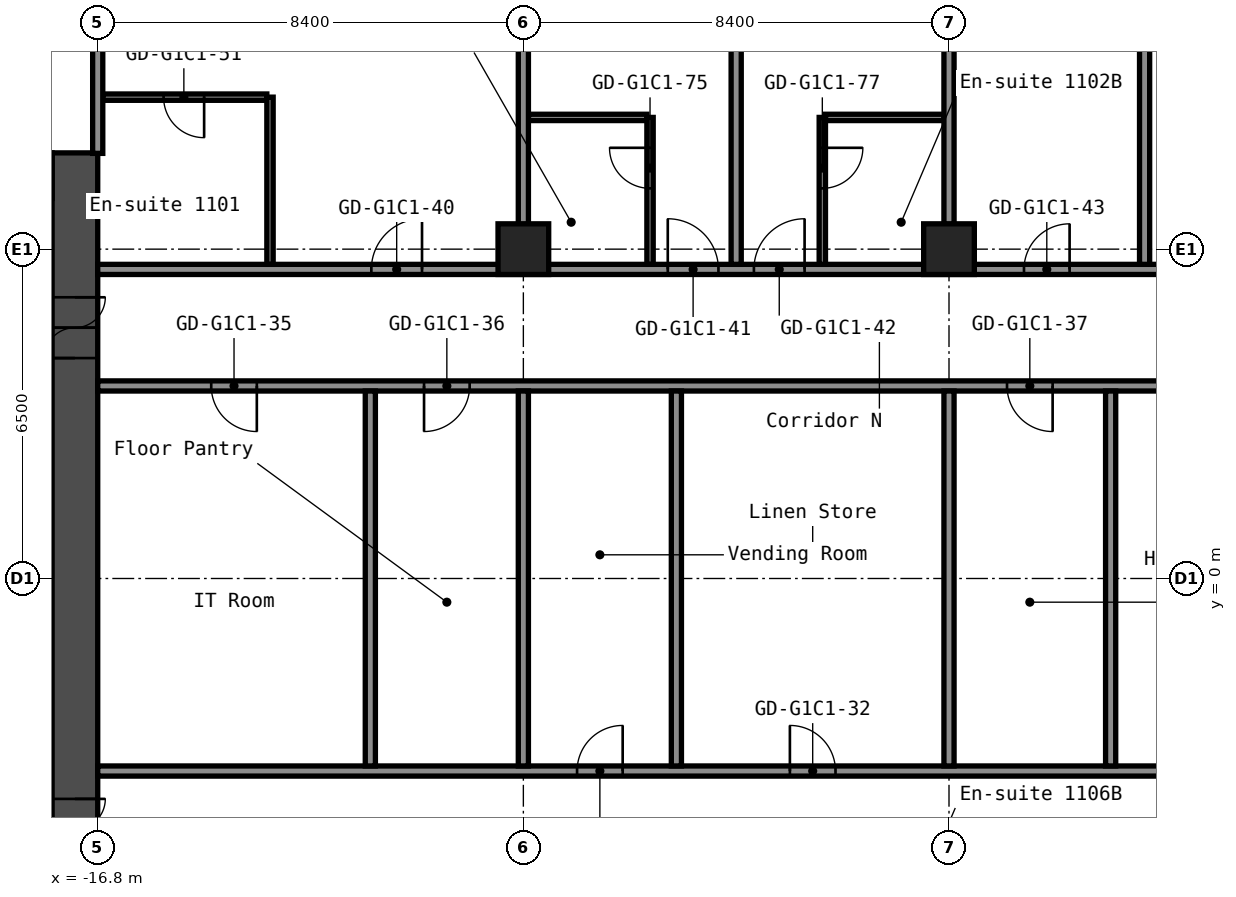
"""IFC4 building model, lengths in metres.
Left out: names, types, materials, properties, quantities, classifications, styles, units other than length and angle.
Written with IfcOpenShell. Run it as: python <this file> out.ifc"""

import sys

from ifc_helpers import new_model, si_unit, direction, frame, frame_2d, origin, origin_2d, place, context, subcontext, project, spatial, rectangle, hollow_rectangle, extrude, element, fill, save


model = new_model("IFC4")
c1 = context("Model", 3, precision=1e-05, world=origin(), true_north=direction((0.0, 1.0)))
c2 = subcontext(c1, "Body", "Model", "MODEL_VIEW")
j1 = project(units=[si_unit("LENGTHUNIT", "METRE"), si_unit("PLANEANGLEUNIT", "RADIAN")], contexts=[c1])
p1 = place(None, origin())
s1 = spatial("IfcSite", under=j1, at=p1, CompositionType="ELEMENT")
p2 = place(p1, origin())
s2 = spatial("IfcBuilding", under=s1, at=p2, CompositionType="ELEMENT")
p3 = place(p2, frame((0.0, 0.0, 42.2)))
s3 = spatial("IfcBuildingStorey", under=s2, at=p3, CompositionType="ELEMENT", Elevation=42.2)
for number, where, z_axis, x_axis in (
    (1, (-8.4, 6.5, 0.0), (0.0, 0.0, 1.0), (1.0, 0.0, 0.0)),
    (2, (0.0, 6.5, 0.0), (0.0, 0.0, 1.0), (1.0, 0.0, 0.0)),
):
    element("IfcColumn", number, at=place(p3, frame(where, z_axis=z_axis, x_axis=x_axis)), inside=s3, PredefinedType="COLUMN", context=c2, shape_type="SweptSolid", body=[
        extrude(hollow_rectangle(XDim=1.0, YDim=1.0, WallThickness=0.04, at=origin_2d()), origin(), (0.0, 0.0, 1.0), 2.8),
    ])
p4 = place(p3, frame((-17.25, -8.4, 0.0), z_axis=(0.0, 0.0, 1.0), x_axis=(0.0, 1.0, 0.0)))
e3 = element("IfcWall", 3, at=p4, inside=s3, PredefinedType="SHEAR", context=c2, shape_type="SweptSolid", body=[
    extrude(rectangle(XDim=16.8, YDim=0.9, at=frame_2d((8.4, 0.0))), origin(), (0.0, 0.0, 1.0), 2.8),
])
p5 = place(p4, frame((12.75, 0.0, 0.0)))
e4 = element("IfcOpeningElement", 4, at=p5, cuts=e3, PredefinedType="OPENING", context=c2, shape_type="SweptSolid", body=[
    extrude(rectangle(XDim=1.2, YDim=2.1, at=frame_2d((0.6, 1.05))), frame((0.0, 0.46, 0.0), z_axis=(0.0, -1.0, 0.0), x_axis=(1.0, 0.0, 0.0)), (0.0, 0.0, 1.0), 0.92),
])
p6 = place(p4, frame((2.85, 0.0, 0.0)))
e5 = element("IfcOpeningElement", 5, at=p6, cuts=e3, PredefinedType="OPENING", context=c2, shape_type="SweptSolid", body=[
    extrude(rectangle(XDim=1.2, YDim=2.1, at=frame_2d((0.6, 1.05))), frame((0.0, 0.46, 0.0), z_axis=(0.0, -1.0, 0.0), x_axis=(1.0, 0.0, 0.0)), (0.0, 0.0, 1.0), 0.92),
])
p7 = place(p3, frame((-32.7, 7.95, 0.0), z_axis=(0.0, 0.0, 1.0), x_axis=(1.0, 0.0, 0.0)))
e6 = element("IfcWall", 6, at=p7, inside=s3, PredefinedType="SHEAR", context=c2, shape_type="SweptSolid", body=[
    extrude(rectangle(XDim=15.0, YDim=0.9, at=frame_2d((7.5, 0.0))), origin(), (0.0, 0.0, 1.0), 2.8),
])
p8 = place(p7, frame((3.4, 0.0, 0.0)))
e7 = element("IfcOpeningElement", 7, at=p8, cuts=e6, PredefinedType="OPENING", context=c2, shape_type="SweptSolid", body=[
    extrude(rectangle(XDim=1.2, YDim=2.1, at=frame_2d((0.6, 1.05))), frame((0.0, 0.46, 0.0), z_axis=(0.0, -1.0, 0.0), x_axis=(1.0, 0.0, 0.0)), (0.0, 0.0, 1.0), 0.92),
])
p9 = place(p7, frame((0.75, 0.0, 0.0)))
e8 = element("IfcOpeningElement", 8, at=p9, cuts=e6, PredefinedType="OPENING", context=c2, shape_type="SweptSolid", body=[
    extrude(rectangle(XDim=0.9, YDim=2.1, at=frame_2d((0.45, 1.05))), frame((0.0, 0.46, 0.0), z_axis=(0.0, -1.0, 0.0), x_axis=(1.0, 0.0, 0.0)), (0.0, 0.0, 1.0), 0.92),
])
p10 = place(p3, frame((-16.8, -3.8, 0.0), z_axis=(0.0, 0.0, 1.0), x_axis=(1.0, 0.0, 0.0)))
e9 = element("IfcWall", 9, at=p10, inside=s3, PredefinedType="PARTITIONING", context=c2, shape_type="SweptSolid", body=[
    extrude(rectangle(XDim=33.6, YDim=0.2, at=frame_2d((16.8, 0.0))), origin(), (0.0, 0.0, 1.0), 2.8),
])
p11 = place(p10, frame((9.46, 0.0, 0.0)))
e10 = element("IfcOpeningElement", 10, at=p11, cuts=e9, PredefinedType="OPENING", context=c2, shape_type="SweptSolid", body=[
    extrude(rectangle(XDim=0.9, YDim=2.1, at=frame_2d((0.45, 1.05))), frame((0.0, 0.11, 0.0), z_axis=(0.0, -1.0, 0.0), x_axis=(1.0, 0.0, 0.0)), (0.0, 0.0, 1.0), 0.22),
])
p12 = place(p10, frame((13.66, 0.0, 0.0)))
e11 = element("IfcOpeningElement", 11, at=p12, cuts=e9, PredefinedType="OPENING", context=c2, shape_type="SweptSolid", body=[
    extrude(rectangle(XDim=0.9, YDim=2.1, at=frame_2d((0.45, 1.05))), frame((0.0, 0.11, 0.0), z_axis=(0.0, -1.0, 0.0), x_axis=(1.0, 0.0, 0.0)), (0.0, 0.0, 1.0), 0.22),
])
p13 = place(p10, frame((26.6, 0.0, 0.0)))
e12 = element("IfcOpeningElement", 12, at=p13, cuts=e9, PredefinedType="OPENING", context=c2, shape_type="SweptSolid", body=[
    extrude(rectangle(XDim=0.9, YDim=2.1, at=frame_2d((0.45, 1.05))), frame((0.0, 0.11, 0.0), z_axis=(0.0, -1.0, 0.0), x_axis=(1.0, 0.0, 0.0)), (0.0, 0.0, 1.0), 0.22),
])
p14 = place(p10, frame((30.8, 0.0, 0.0)))
e13 = element("IfcOpeningElement", 13, at=p14, cuts=e9, PredefinedType="OPENING", context=c2, shape_type="SweptSolid", body=[
    extrude(rectangle(XDim=0.9, YDim=2.1, at=frame_2d((0.45, 1.05))), frame((0.0, 0.11, 0.0), z_axis=(0.0, -1.0, 0.0), x_axis=(1.0, 0.0, 0.0)), (0.0, 0.0, 1.0), 0.22),
])
p15 = place(p3, frame((-16.8, 3.8, 0.0), z_axis=(0.0, 0.0, 1.0), x_axis=(1.0, 0.0, 0.0)))
e14 = element("IfcWall", 14, at=p15, inside=s3, PredefinedType="PARTITIONING", context=c2, shape_type="SweptSolid", body=[
    extrude(rectangle(XDim=33.6, YDim=0.2, at=frame_2d((16.8, 0.0))), origin(), (0.0, 0.0, 1.0), 2.8),
])
p16 = place(p15, frame((2.24, 0.0, 0.0)))
e15 = element("IfcOpeningElement", 15, at=p16, cuts=e14, PredefinedType="OPENING", context=c2, shape_type="SweptSolid", body=[
    extrude(rectangle(XDim=0.9, YDim=2.1, at=frame_2d((0.45, 1.05))), frame((0.0, 0.11, 0.0), z_axis=(0.0, -1.0, 0.0), x_axis=(1.0, 0.0, 0.0)), (0.0, 0.0, 1.0), 0.22),
])
p17 = place(p15, frame((6.44, 0.0, 0.0)))
e16 = element("IfcOpeningElement", 16, at=p17, cuts=e14, PredefinedType="OPENING", context=c2, shape_type="SweptSolid", body=[
    extrude(rectangle(XDim=0.9, YDim=2.1, at=frame_2d((0.45, 1.05))), frame((0.0, 0.11, 0.0), z_axis=(0.0, -1.0, 0.0), x_axis=(1.0, 0.0, 0.0)), (0.0, 0.0, 1.0), 0.22),
])
p18 = place(p15, frame((17.945, 0.0, 0.0)))
e17 = element("IfcOpeningElement", 17, at=p18, cuts=e14, PredefinedType="OPENING", context=c2, shape_type="SweptSolid", body=[
    extrude(rectangle(XDim=0.9, YDim=2.1, at=frame_2d((0.45, 1.05))), frame((0.0, 0.11, 0.0), z_axis=(0.0, -1.0, 0.0), x_axis=(1.0, 0.0, 0.0)), (0.0, 0.0, 1.0), 0.22),
])
p19 = place(p15, frame((22.145, 0.0, 0.0)))
e18 = element("IfcOpeningElement", 18, at=p19, cuts=e14, PredefinedType="OPENING", context=c2, shape_type="SweptSolid", body=[
    extrude(rectangle(XDim=0.9, YDim=2.1, at=frame_2d((0.45, 1.05))), frame((0.0, 0.11, 0.0), z_axis=(0.0, -1.0, 0.0), x_axis=(1.0, 0.0, 0.0)), (0.0, 0.0, 1.0), 0.22),
])
p20 = place(p3, frame((-16.8, 6.1, 0.0), z_axis=(0.0, 0.0, 1.0), x_axis=(1.0, 0.0, 0.0)))
e19 = element("IfcWall", 19, at=p20, inside=s3, PredefinedType="PARTITIONING", context=c2, shape_type="SweptSolid", body=[
    extrude(rectangle(XDim=33.6, YDim=0.2, at=frame_2d((16.8, 0.0))), origin(), (0.0, 0.0, 1.0), 2.8),
])
p21 = place(p20, frame((5.4, 0.0, 0.0)))
e20 = element("IfcOpeningElement", 20, at=p21, cuts=e19, PredefinedType="OPENING", context=c2, shape_type="SweptSolid", body=[
    extrude(rectangle(XDim=1.0, YDim=2.1, at=frame_2d((0.5, 1.05))), frame((0.0, 0.11, 0.0), z_axis=(0.0, -1.0, 0.0), x_axis=(1.0, 0.0, 0.0)), (0.0, 0.0, 1.0), 0.22),
])
p22 = place(p20, frame((11.25, 0.0, 0.0)))
e21 = element("IfcOpeningElement", 21, at=p22, cuts=e19, PredefinedType="OPENING", context=c2, shape_type="SweptSolid", body=[
    extrude(rectangle(XDim=1.0, YDim=2.1, at=frame_2d((0.5, 1.05))), frame((0.0, 0.11, 0.0), z_axis=(0.0, -1.0, 0.0), x_axis=(1.0, 0.0, 0.0)), (0.0, 0.0, 1.0), 0.22),
])
p23 = place(p20, frame((12.95, 0.0, 0.0)))
e22 = element("IfcOpeningElement", 22, at=p23, cuts=e19, PredefinedType="OPENING", context=c2, shape_type="SweptSolid", body=[
    extrude(rectangle(XDim=1.0, YDim=2.1, at=frame_2d((0.5, 1.05))), frame((0.0, 0.11, 0.0), z_axis=(0.0, -1.0, 0.0), x_axis=(1.0, 0.0, 0.0)), (0.0, 0.0, 1.0), 0.22),
])
p24 = place(p20, frame((18.28, 0.0, 0.0)))
e23 = element("IfcOpeningElement", 23, at=p24, cuts=e19, PredefinedType="OPENING", context=c2, shape_type="SweptSolid", body=[
    extrude(rectangle(XDim=0.9, YDim=2.1, at=frame_2d((0.45, 1.05))), frame((0.0, 0.11, 0.0), z_axis=(0.0, -1.0, 0.0), x_axis=(1.0, 0.0, 0.0)), (0.0, 0.0, 1.0), 0.22),
])
p25 = place(p20, frame((22.48, 0.0, 0.0)))
e24 = element("IfcOpeningElement", 24, at=p25, cuts=e19, PredefinedType="OPENING", context=c2, shape_type="SweptSolid", body=[
    extrude(rectangle(XDim=0.9, YDim=2.1, at=frame_2d((0.45, 1.05))), frame((0.0, 0.11, 0.0), z_axis=(0.0, -1.0, 0.0), x_axis=(1.0, 0.0, 0.0)), (0.0, 0.0, 1.0), 0.22),
])
p26 = place(p20, frame((28.05, 0.0, 0.0)))
e25 = element("IfcOpeningElement", 25, at=p26, cuts=e19, PredefinedType="OPENING", context=c2, shape_type="SweptSolid", body=[
    extrude(rectangle(XDim=1.0, YDim=2.1, at=frame_2d((0.5, 1.05))), frame((0.0, 0.11, 0.0), z_axis=(0.0, -1.0, 0.0), x_axis=(1.0, 0.0, 0.0)), (0.0, 0.0, 1.0), 0.22),
])
p27 = place(p20, frame((29.75, 0.0, 0.0)))
e26 = element("IfcOpeningElement", 26, at=p27, cuts=e19, PredefinedType="OPENING", context=c2, shape_type="SweptSolid", body=[
    extrude(rectangle(XDim=1.0, YDim=2.1, at=frame_2d((0.5, 1.05))), frame((0.0, 0.11, 0.0), z_axis=(0.0, -1.0, 0.0), x_axis=(1.0, 0.0, 0.0)), (0.0, 0.0, 1.0), 0.22),
])
p28 = place(p3, frame((-8.3, 9.1, 0.0), z_axis=(0.0, 0.0, 1.0), x_axis=(1.0, 0.0, 0.0)))
e27 = element("IfcWall", 27, at=p28, inside=s3, PredefinedType="PARTITIONING", context=c2, shape_type="SweptSolid", body=[
    extrude(rectangle(XDim=2.338, YDim=0.125, at=frame_2d((1.169, 0.0))), origin(), (0.0, 0.0, 1.0), 2.8),
])
p29 = place(p3, frame((-2.438, 9.1, 0.0), z_axis=(0.0, 0.0, 1.0), x_axis=(1.0, 0.0, 0.0)))
e28 = element("IfcWall", 28, at=p29, inside=s3, PredefinedType="PARTITIONING", context=c2, shape_type="SweptSolid", body=[
    extrude(rectangle(XDim=2.337, YDim=0.125, at=frame_2d((1.169, 0.0))), origin(), (0.0, 0.0, 1.0), 2.8),
])
p30 = place(p3, frame((-16.7, 9.5, 0.0), z_axis=(0.0, 0.0, 1.0), x_axis=(1.0, 0.0, 0.0)))
e29 = element("IfcWall", 29, at=p30, inside=s3, PredefinedType="PARTITIONING", context=c2, shape_type="SweptSolid", body=[
    extrude(rectangle(XDim=3.238, YDim=0.125, at=frame_2d((1.619, 0.0))), origin(), (0.0, 0.0, 1.0), 2.8),
])
p31 = place(p30, frame((1.2, 0.0, 0.0)))
e30 = element("IfcOpeningElement", 30, at=p31, cuts=e29, PredefinedType="OPENING", context=c2, shape_type="SweptSolid", body=[
    extrude(rectangle(XDim=0.8, YDim=2.1, at=frame_2d((0.4, 1.05))), frame((0.0, 0.073, 0.0), z_axis=(0.0, -1.0, 0.0), x_axis=(1.0, 0.0, 0.0)), (0.0, 0.0, 1.0), 0.145),
])
p32 = place(p3, frame((-16.8, 8.39, 0.0), z_axis=(0.0, 0.0, 1.0), x_axis=(0.0, 1.0, 0.0)))
e31 = element("IfcWall", 31, at=p32, inside=s3, PredefinedType="PARTITIONING", context=c2, shape_type="SweptSolid", body=[
    extrude(rectangle(XDim=11.91, YDim=0.2, at=frame_2d((5.955, 0.0))), origin(), (0.0, 0.0, 1.0), 2.8),
])
p33 = place(p3, frame((-13.4, 6.2, 0.0), z_axis=(0.0, 0.0, 1.0), x_axis=(0.0, 1.0, 0.0)))
e32 = element("IfcWall", 32, at=p33, inside=s3, PredefinedType="PARTITIONING", context=c2, shape_type="SweptSolid", body=[
    extrude(rectangle(XDim=3.3, YDim=0.125, at=frame_2d((1.65, 0.0))), origin(), (0.0, 0.0, 1.0), 2.8),
])
for number, where, z_axis, x_axis in (
    (33, (-11.42, -3.7, 0.0), (0.0, 0.0, 1.0), (0.0, 1.0, 0.0)),
    (34, (-8.4, -3.7, 0.0), (0.0, 0.0, 1.0), (0.0, 1.0, 0.0)),
):
    element("IfcWall", number, at=place(p3, frame(where, z_axis=z_axis, x_axis=x_axis)), inside=s3, PredefinedType="PARTITIONING", context=c2, shape_type="SweptSolid", body=[
        extrude(rectangle(XDim=7.4, YDim=0.2, at=frame_2d((3.7, 0.0))), origin(), (0.0, 0.0, 1.0), 2.8),
    ])
p34 = place(p3, frame((-8.4, 6.99, 0.0), z_axis=(0.0, 0.0, 1.0), x_axis=(0.0, 1.0, 0.0)))
e35 = element("IfcWall", 35, at=p34, inside=s3, PredefinedType="PARTITIONING", context=c2, shape_type="SweptSolid", body=[
    extrude(rectangle(XDim=13.31, YDim=0.2, at=frame_2d((6.655, 0.0))), origin(), (0.0, 0.0, 1.0), 2.8),
])
p35 = place(p3, frame((-5.9, 6.2, 0.0), z_axis=(0.0, 0.0, 1.0), x_axis=(0.0, 1.0, 0.0)))
e36 = element("IfcWall", 36, at=p35, inside=s3, PredefinedType="PARTITIONING", context=c2, shape_type="SweptSolid", body=[
    extrude(rectangle(XDim=2.9, YDim=0.125, at=frame_2d((1.45, 0.0))), origin(), (0.0, 0.0, 1.0), 2.8),
])
p36 = place(p35, frame((1.5, 0.0, 0.0)))
e37 = element("IfcOpeningElement", 37, at=p36, cuts=e36, PredefinedType="OPENING", context=c2, shape_type="SweptSolid", body=[
    extrude(rectangle(XDim=0.8, YDim=2.1, at=frame_2d((0.4, 1.05))), frame((0.0, 0.073, 0.0), z_axis=(0.0, -1.0, 0.0), x_axis=(1.0, 0.0, 0.0)), (0.0, 0.0, 1.0), 0.145),
])
p37 = place(p3, frame((-5.38, -3.7, 0.0), z_axis=(0.0, 0.0, 1.0), x_axis=(0.0, 1.0, 0.0)))
e38 = element("IfcWall", 38, at=p37, inside=s3, PredefinedType="PARTITIONING", context=c2, shape_type="SweptSolid", body=[
    extrude(rectangle(XDim=7.4, YDim=0.2, at=frame_2d((3.7, 0.0))), origin(), (0.0, 0.0, 1.0), 2.8),
])
p38 = place(p3, frame((-4.2, 6.2, 0.0), z_axis=(0.0, 0.0, 1.0), x_axis=(0.0, 1.0, 0.0)))
e39 = element("IfcWall", 39, at=p38, inside=s3, PredefinedType="PARTITIONING", context=c2, shape_type="SweptSolid", body=[
    extrude(rectangle(XDim=14.1, YDim=0.2, at=frame_2d((7.05, 0.0))), origin(), (0.0, 0.0, 1.0), 2.8),
])
p39 = place(p3, frame((-2.5, 6.2, 0.0), z_axis=(0.0, 0.0, 1.0), x_axis=(0.0, 1.0, 0.0)))
e40 = element("IfcWall", 40, at=p39, inside=s3, PredefinedType="PARTITIONING", context=c2, shape_type="SweptSolid", body=[
    extrude(rectangle(XDim=2.9, YDim=0.125, at=frame_2d((1.45, 0.0))), origin(), (0.0, 0.0, 1.0), 2.8),
])
p40 = place(p39, frame((1.5, 0.0, 0.0)))
e41 = element("IfcOpeningElement", 41, at=p40, cuts=e40, PredefinedType="OPENING", context=c2, shape_type="SweptSolid", body=[
    extrude(rectangle(XDim=0.8, YDim=2.1, at=frame_2d((0.4, 1.05))), frame((0.0, 0.073, 0.0), z_axis=(0.0, -1.0, 0.0), x_axis=(1.0, 0.0, 0.0)), (0.0, 0.0, 1.0), 0.145),
])
p41 = place(p3, frame((0.0, -3.7, 0.0), z_axis=(0.0, 0.0, 1.0), x_axis=(0.0, 1.0, 0.0)))
e42 = element("IfcWall", 42, at=p41, inside=s3, PredefinedType="PARTITIONING", context=c2, shape_type="SweptSolid", body=[
    extrude(rectangle(XDim=7.4, YDim=0.2, at=frame_2d((3.7, 0.0))), origin(), (0.0, 0.0, 1.0), 2.8),
])
p42 = place(p3, frame((0.0, 6.99, 0.0), z_axis=(0.0, 0.0, 1.0), x_axis=(0.0, 1.0, 0.0)))
e43 = element("IfcWall", 43, at=p42, inside=s3, PredefinedType="PARTITIONING", context=c2, shape_type="SweptSolid", body=[
    extrude(rectangle(XDim=13.31, YDim=0.2, at=frame_2d((6.655, 0.0))), origin(), (0.0, 0.0, 1.0), 2.8),
])
p43 = place(p3, frame((3.19, -3.7, 0.0), z_axis=(0.0, 0.0, 1.0), x_axis=(0.0, 1.0, 0.0)))
e44 = element("IfcWall", 44, at=p43, inside=s3, PredefinedType="PARTITIONING", context=c2, shape_type="SweptSolid", body=[
    extrude(rectangle(XDim=7.4, YDim=0.2, at=frame_2d((3.7, 0.0))), origin(), (0.0, 0.0, 1.0), 2.8),
])
p44 = place(p3, frame((3.86, 6.2, 0.0), z_axis=(0.0, 0.0, 1.0), x_axis=(0.0, 1.0, 0.0)))
e45 = element("IfcWall", 45, at=p44, inside=s3, PredefinedType="PARTITIONING", context=c2, shape_type="SweptSolid", body=[
    extrude(rectangle(XDim=14.1, YDim=0.2, at=frame_2d((7.05, 0.0))), origin(), (0.0, 0.0, 1.0), 2.8),
])
p45 = place(p5, origin())
e46 = element("IfcDoor", 46, at=p45, inside=s3, OperationType="DOUBLE_DOOR_SINGLE_SWING", PredefinedType="DOOR", context=c2, shape_type="SweptSolid", body=[
    extrude(rectangle(XDim=1.2, YDim=2.1, at=frame_2d((0.6, 1.05))), frame((0.0, 0.025, 0.0), z_axis=(0.0, -1.0, 0.0), x_axis=(1.0, 0.0, 0.0)), (0.0, 0.0, 1.0), 0.05),
])
fill(e4, e46)
p46 = place(p6, origin())
e47 = element("IfcDoor", 47, at=p46, inside=s3, OperationType="DOUBLE_DOOR_SINGLE_SWING", PredefinedType="DOOR", context=c2, shape_type="SweptSolid", body=[
    extrude(rectangle(XDim=1.2, YDim=2.1, at=frame_2d((0.6, 1.05))), frame((0.0, 0.025, 0.0), z_axis=(0.0, -1.0, 0.0), x_axis=(1.0, 0.0, 0.0)), (0.0, 0.0, 1.0), 0.05),
])
fill(e5, e47)
p47 = place(p11, origin())
e48 = element("IfcDoor", 48, at=p47, inside=s3, OperationType="SINGLE_SWING_LEFT", PredefinedType="DOOR", context=c2, shape_type="SweptSolid", body=[
    extrude(rectangle(XDim=0.9, YDim=2.1, at=frame_2d((0.45, 1.05))), frame((0.0, 0.025, 0.0), z_axis=(0.0, -1.0, 0.0), x_axis=(1.0, 0.0, 0.0)), (0.0, 0.0, 1.0), 0.05),
])
fill(e10, e48)
p48 = place(p12, origin())
e49 = element("IfcDoor", 49, at=p48, inside=s3, OperationType="SINGLE_SWING_RIGHT", PredefinedType="DOOR", context=c2, shape_type="SweptSolid", body=[
    extrude(rectangle(XDim=0.9, YDim=2.1, at=frame_2d((0.45, 1.05))), frame((0.0, 0.025, 0.0), z_axis=(0.0, -1.0, 0.0), x_axis=(1.0, 0.0, 0.0)), (0.0, 0.0, 1.0), 0.05),
])
fill(e11, e49)
p49 = place(p16, origin())
e50 = element("IfcDoor", 50, at=p49, inside=s3, OperationType="SINGLE_SWING_RIGHT", PredefinedType="DOOR", context=c2, shape_type="SweptSolid", body=[
    extrude(rectangle(XDim=0.9, YDim=2.1, at=frame_2d((0.45, 1.05))), frame((0.0, 0.025, 0.0), z_axis=(0.0, -1.0, 0.0), x_axis=(1.0, 0.0, 0.0)), (0.0, 0.0, 1.0), 0.05),
])
fill(e15, e50)
p50 = place(p17, origin())
e51 = element("IfcDoor", 51, at=p50, inside=s3, OperationType="SINGLE_SWING_LEFT", PredefinedType="DOOR", context=c2, shape_type="SweptSolid", body=[
    extrude(rectangle(XDim=0.9, YDim=2.1, at=frame_2d((0.45, 1.05))), frame((0.0, 0.025, 0.0), z_axis=(0.0, -1.0, 0.0), x_axis=(1.0, 0.0, 0.0)), (0.0, 0.0, 1.0), 0.05),
])
fill(e16, e51)
p51 = place(p18, origin())
e52 = element("IfcDoor", 52, at=p51, inside=s3, OperationType="SINGLE_SWING_RIGHT", PredefinedType="DOOR", context=c2, shape_type="SweptSolid", body=[
    extrude(rectangle(XDim=0.9, YDim=2.1, at=frame_2d((0.45, 1.05))), frame((0.0, 0.025, 0.0), z_axis=(0.0, -1.0, 0.0), x_axis=(1.0, 0.0, 0.0)), (0.0, 0.0, 1.0), 0.05),
])
fill(e17, e52)
p52 = place(p21, origin())
e53 = element("IfcDoor", 53, at=p52, inside=s3, OperationType="SINGLE_SWING_LEFT", PredefinedType="DOOR", context=c2, shape_type="SweptSolid", body=[
    extrude(rectangle(XDim=1.0, YDim=2.1, at=frame_2d((0.5, 1.05))), frame((0.0, 0.025, 0.0), z_axis=(0.0, -1.0, 0.0), x_axis=(1.0, 0.0, 0.0)), (0.0, 0.0, 1.0), 0.05),
])
fill(e20, e53)
p53 = place(p22, origin())
e54 = element("IfcDoor", 54, at=p53, inside=s3, OperationType="SINGLE_SWING_RIGHT", PredefinedType="DOOR", context=c2, shape_type="SweptSolid", body=[
    extrude(rectangle(XDim=1.0, YDim=2.1, at=frame_2d((0.5, 1.05))), frame((0.0, 0.025, 0.0), z_axis=(0.0, -1.0, 0.0), x_axis=(1.0, 0.0, 0.0)), (0.0, 0.0, 1.0), 0.05),
])
fill(e21, e54)
p54 = place(p23, origin())
e55 = element("IfcDoor", 55, at=p54, inside=s3, OperationType="SINGLE_SWING_LEFT", PredefinedType="DOOR", context=c2, shape_type="SweptSolid", body=[
    extrude(rectangle(XDim=1.0, YDim=2.1, at=frame_2d((0.5, 1.05))), frame((0.0, 0.025, 0.0), z_axis=(0.0, -1.0, 0.0), x_axis=(1.0, 0.0, 0.0)), (0.0, 0.0, 1.0), 0.05),
])
fill(e22, e55)
p55 = place(p24, origin())
e56 = element("IfcDoor", 56, at=p55, inside=s3, OperationType="SINGLE_SWING_LEFT", PredefinedType="DOOR", context=c2, shape_type="SweptSolid", body=[
    extrude(rectangle(XDim=0.9, YDim=2.1, at=frame_2d((0.45, 1.05))), frame((0.0, 0.025, 0.0), z_axis=(0.0, -1.0, 0.0), x_axis=(1.0, 0.0, 0.0)), (0.0, 0.0, 1.0), 0.05),
])
fill(e23, e56)
p56 = place(p31, origin())
e57 = element("IfcDoor", 57, at=p56, inside=s3, OperationType="SINGLE_SWING_RIGHT", PredefinedType="DOOR", context=c2, shape_type="SweptSolid", body=[
    extrude(rectangle(XDim=0.8, YDim=2.1, at=frame_2d((0.4, 1.05))), frame((0.0, 0.025, 0.0), z_axis=(0.0, -1.0, 0.0), x_axis=(1.0, 0.0, 0.0)), (0.0, 0.0, 1.0), 0.05),
])
fill(e30, e57)
p57 = place(p36, origin())
e58 = element("IfcDoor", 58, at=p57, inside=s3, OperationType="SINGLE_SWING_LEFT", PredefinedType="DOOR", context=c2, shape_type="SweptSolid", body=[
    extrude(rectangle(XDim=0.8, YDim=2.1, at=frame_2d((0.4, 1.05))), frame((0.0, 0.025, 0.0), z_axis=(0.0, -1.0, 0.0), x_axis=(1.0, 0.0, 0.0)), (0.0, 0.0, 1.0), 0.05),
])
fill(e37, e58)
p58 = place(p40, origin())
e59 = element("IfcDoor", 59, at=p58, inside=s3, OperationType="SINGLE_SWING_RIGHT", PredefinedType="DOOR", context=c2, shape_type="SweptSolid", body=[
    extrude(rectangle(XDim=0.8, YDim=2.1, at=frame_2d((0.4, 1.05))), frame((0.0, 0.025, 0.0), z_axis=(0.0, -1.0, 0.0), x_axis=(1.0, 0.0, 0.0)), (0.0, 0.0, 1.0), 0.05),
])
fill(e41, e59)
save(model, sys.argv[1])
